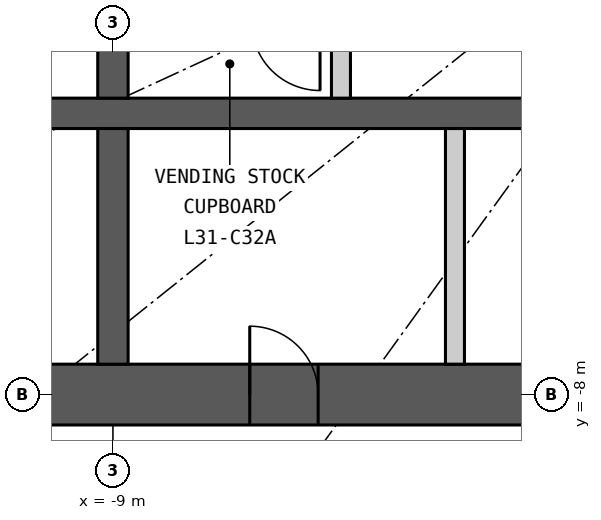
"""IFC4 building model, lengths in metres.
Left out: names, types, materials, properties, quantities, classifications, styles, units other than length and angle.
Written with IfcOpenShell. Run it as: python <this file> out.ifc"""

import sys

from ifc_helpers import new_model, si_unit, direction, frame, frame_2d, origin, place, context, subcontext, project, spatial, rectangle, extrude, element, fill, save


model = new_model("IFC4")
c1 = context("Model", 3, precision=1e-05, world=origin(), true_north=direction((0.0, 1.0)))
c2 = subcontext(c1, "Body", "Model", "MODEL_VIEW")
j1 = project(units=[si_unit("LENGTHUNIT", "METRE"), si_unit("PLANEANGLEUNIT", "RADIAN")], contexts=[c1])
p1 = place(None, origin())
s1 = spatial("IfcSite", under=j1, at=p1, CompositionType="ELEMENT")
p2 = place(p1, origin())
s2 = spatial("IfcBuilding", under=s1, at=p2, CompositionType="ELEMENT")
p3 = place(p2, frame((0.0, 0.0, 122.1)))
s3 = spatial("IfcBuildingStorey", under=s2, at=p3, CompositionType="ELEMENT", Elevation=122.1)
p4 = place(p3, frame((12.4, -8.0, 0.0), z_axis=(0.0, 0.0, 1.0), x_axis=(-1.0, 0.0, 0.0)))
e1 = element("IfcWall", 1, at=p4, inside=s3, PredefinedType="SHEAR", context=c2, shape_type="SweptSolid", body=[
    extrude(rectangle(XDim=24.8, YDim=0.8, at=frame_2d((12.4, 0.0))), origin(), (0.0, 0.0, 1.0), 3.3),
])
p5 = place(p4, frame((11.1, 0.0, 0.0)))
e2 = element("IfcOpeningElement", 2, at=p5, cuts=e1, PredefinedType="OPENING", context=c2, shape_type="SweptSolid", body=[
    extrude(rectangle(XDim=1.2, YDim=2.2, at=frame_2d((0.6, 1.1))), frame((0.0, 0.41, 0.0), z_axis=(0.0, -1.0, 0.0), x_axis=(1.0, 0.0, 0.0)), (0.0, 0.0, 1.0), 0.82),
])
p6 = place(p4, frame((18.7, 0.0, 0.0)))
e3 = element("IfcOpeningElement", 3, at=p6, cuts=e1, PredefinedType="OPENING", context=c2, shape_type="SweptSolid", body=[
    extrude(rectangle(XDim=0.9, YDim=2.2, at=frame_2d((0.45, 1.1))), frame((0.0, 0.41, 0.0), z_axis=(0.0, -1.0, 0.0), x_axis=(1.0, 0.0, 0.0)), (0.0, 0.0, 1.0), 0.82),
])
p7 = place(p3, frame((-11.6, -4.3, 0.0), z_axis=(0.0, 0.0, 1.0), x_axis=(1.0, 0.0, 0.0)))
e4 = element("IfcWall", 4, at=p7, inside=s3, PredefinedType="SHEAR", context=c2, shape_type="SweptSolid", body=[
    extrude(rectangle(XDim=23.2, YDim=0.4, at=frame_2d((11.6, 0.0))), origin(), (0.0, 0.0, 1.0), 3.3),
])
p8 = place(p3, frame((-9.0, -4.1, 0.0), z_axis=(0.0, 0.0, 1.0), x_axis=(0.0, 1.0, 0.0)))
e5 = element("IfcWall", 5, at=p8, inside=s3, PredefinedType="SHEAR", context=c2, shape_type="SweptSolid", body=[
    extrude(rectangle(XDim=2.35, YDim=0.4, at=frame_2d((1.175, 0.0))), origin(), (0.0, 0.0, 1.0), 3.3),
])
p9 = place(p3, frame((-9.0, -7.6, 0.0), z_axis=(0.0, 0.0, 1.0), x_axis=(0.0, 1.0, 0.0)))
e6 = element("IfcWall", 6, at=p9, inside=s3, PredefinedType="SHEAR", context=c2, shape_type="SweptSolid", body=[
    extrude(rectangle(XDim=3.1, YDim=0.4, at=frame_2d((1.55, 0.0))), origin(), (0.0, 0.0, 1.0), 3.3),
])
p10 = place(p3, frame((-4.5, -7.6, 0.0), z_axis=(0.0, 0.0, 1.0), x_axis=(0.0, 1.0, 0.0)))
e7 = element("IfcWall", 7, at=p10, inside=s3, PredefinedType="PARTITIONING", context=c2, shape_type="SweptSolid", body=[
    extrude(rectangle(XDim=3.1, YDim=0.25, at=frame_2d((1.55, 0.0))), origin(), (0.0, 0.0, 1.0), 3.3),
])
p11 = place(p3, frame((-6.0, -4.1, 0.0), z_axis=(0.0, 0.0, 1.0), x_axis=(0.0, 1.0, 0.0)))
e8 = element("IfcWall", 8, at=p11, inside=s3, PredefinedType="PARTITIONING", context=c2, shape_type="SweptSolid", body=[
    extrude(rectangle(XDim=2.35, YDim=0.25, at=frame_2d((1.175, 0.0))), origin(), (0.0, 0.0, 1.0), 3.3),
])
p12 = place(p6, origin())
e9 = element("IfcDoor", 9, at=p12, inside=s3, OperationType="SINGLE_SWING_RIGHT", PredefinedType="DOOR", context=c2, shape_type="SweptSolid", body=[
    extrude(rectangle(XDim=0.9, YDim=2.2, at=frame_2d((0.45, 1.1))), frame((0.0, 0.025, 0.0), z_axis=(0.0, -1.0, 0.0), x_axis=(1.0, 0.0, 0.0)), (0.0, 0.0, 1.0), 0.05),
])
fill(e3, e9)
save(model, sys.argv[1])
